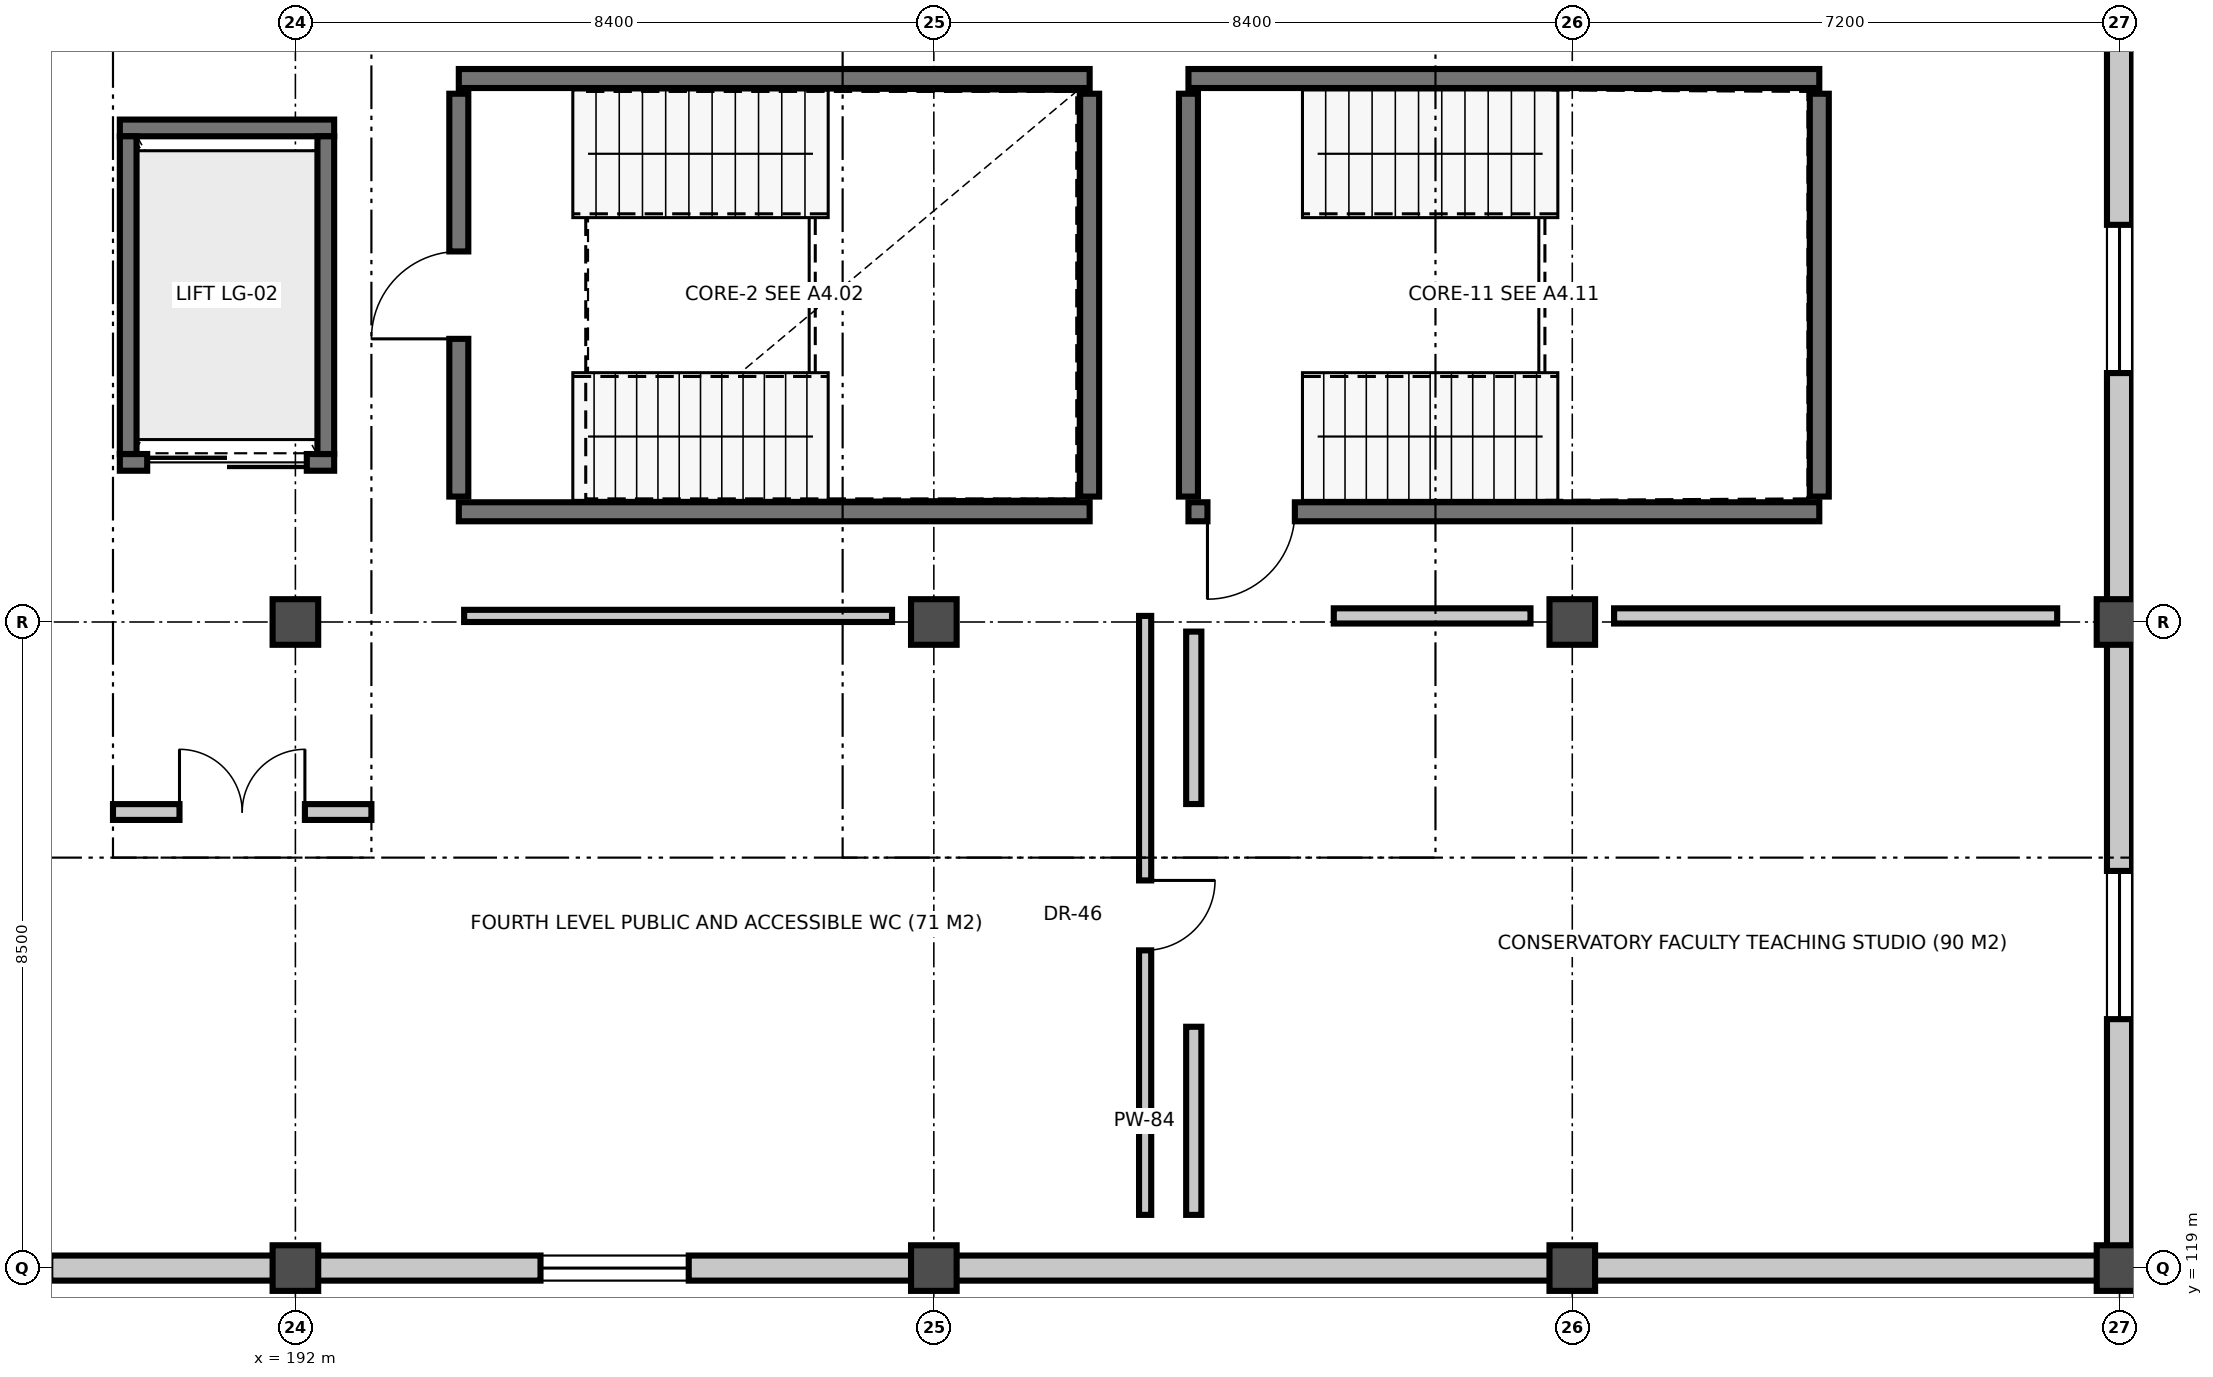
"""IFC4 building model, lengths in metres.
Left out: names, types, materials, properties, quantities, classifications, styles, units other than length and angle.
Written with IfcOpenShell. Run it as: python <this file> out.ifc"""

import sys

from ifc_helpers import new_model, si_unit, direction, frame, frame_2d, origin, origin_2d, place, context, subcontext, project, spatial, rectangle, extrude, element, fill, save


model = new_model("IFC4")
c1 = context("Model", 3, precision=1e-05, world=origin(), true_north=direction((0.0, 1.0)))
c2 = subcontext(c1, "Body", "Model", "MODEL_VIEW")
j1 = project(units=[si_unit("LENGTHUNIT", "METRE"), si_unit("PLANEANGLEUNIT", "RADIAN")], contexts=[c1])
p1 = place(None, origin())
s1 = spatial("IfcSite", under=j1, at=p1, CompositionType="ELEMENT")
p2 = place(p1, origin())
s2 = spatial("IfcBuilding", under=s1, at=p2, CompositionType="ELEMENT")
p3 = place(p2, frame((0.0, 0.0, 19.5)))
s3 = spatial("IfcBuildingStorey", under=s2, at=p3, CompositionType="ELEMENT", Elevation=19.5)
for number, where, z_axis, x_axis in (
    (1, (192.0, 119.0, 0.0), (0.0, 0.0, 1.0), (1.0, 0.0, 0.0)),
    (2, (192.0, 127.5, 0.0), (0.0, 0.0, 1.0), (1.0, 0.0, 0.0)),
    (3, (200.4, 119.0, 0.0), (0.0, 0.0, 1.0), (1.0, 0.0, 0.0)),
    (4, (200.4, 127.5, 0.0), (0.0, 0.0, 1.0), (1.0, 0.0, 0.0)),
    (5, (208.8, 119.0, 0.0), (0.0, 0.0, 1.0), (1.0, 0.0, 0.0)),
    (6, (208.8, 127.5, 0.0), (0.0, 0.0, 1.0), (1.0, 0.0, 0.0)),
    (7, (216.0, 119.0, 0.0), (0.0, 0.0, 1.0), (1.0, 0.0, 0.0)),
    (8, (216.0, 127.5, 0.0), (0.0, 0.0, 1.0), (1.0, 0.0, 0.0)),
):
    element("IfcColumn", number, at=place(p3, frame(where, z_axis=z_axis, x_axis=x_axis)), inside=s3, PredefinedType="COLUMN", context=c2, shape_type="SweptSolid", body=[
        extrude(rectangle(XDim=0.6, YDim=0.6, at=origin_2d()), origin(), (0.0, 0.0, 1.0), 4.2),
    ])
p4 = place(p3, frame((191.72, 119.0, 0.0), z_axis=(0.0, 0.0, 1.0), x_axis=(-1.0, 0.0, 0.0)))
e9 = element("IfcWall", 9, at=p4, inside=s3, PredefinedType="SOLIDWALL", context=c2, shape_type="SweptSolid", body=[
    extrude(rectangle(XDim=7.84, YDim=0.33, at=frame_2d((3.92, 0.0))), origin(), (0.0, 0.0, 1.0), 3.164),
])
p5 = place(p4, frame((2.945, 0.0, 1.0)))
e10 = element("IfcOpeningElement", 10, at=p5, cuts=e9, PredefinedType="OPENING", context=c2, shape_type="SweptSolid", body=[
    extrude(rectangle(XDim=1.95, YDim=1.8, at=frame_2d((0.975, 0.9))), frame((0.0, 0.175, 0.0), z_axis=(0.0, -1.0, 0.0), x_axis=(1.0, 0.0, 0.0)), (0.0, 0.0, 1.0), 0.35),
])
p6 = place(p3, frame((200.12, 119.0, 0.0), z_axis=(0.0, 0.0, 1.0), x_axis=(-1.0, 0.0, 0.0)))
e11 = element("IfcWall", 11, at=p6, inside=s3, PredefinedType="SOLIDWALL", context=c2, shape_type="SweptSolid", body=[
    extrude(rectangle(XDim=7.84, YDim=0.33, at=frame_2d((3.92, 0.0))), origin(), (0.0, 0.0, 1.0), 3.075),
])
p7 = place(p6, frame((2.945, 0.0, 1.0)))
e12 = element("IfcOpeningElement", 12, at=p7, cuts=e11, PredefinedType="OPENING", context=c2, shape_type="SweptSolid", body=[
    extrude(rectangle(XDim=1.95, YDim=1.8, at=frame_2d((0.975, 0.9))), frame((0.0, 0.175, 0.0), z_axis=(0.0, -1.0, 0.0), x_axis=(1.0, 0.0, 0.0)), (0.0, 0.0, 1.0), 0.35),
])
p8 = place(p3, frame((208.52, 119.0, 0.0), z_axis=(0.0, 0.0, 1.0), x_axis=(-1.0, 0.0, 0.0)))
e13 = element("IfcWall", 13, at=p8, inside=s3, PredefinedType="SOLIDWALL", context=c2, shape_type="SweptSolid", body=[
    extrude(rectangle(XDim=7.84, YDim=0.33, at=frame_2d((3.92, 0.0))), origin(), (0.0, 0.0, 1.0), 3.007),
])
p9 = place(p3, frame((215.72, 119.0, 0.0), z_axis=(0.0, 0.0, 1.0), x_axis=(-1.0, 0.0, 0.0)))
e14 = element("IfcWall", 14, at=p9, inside=s3, PredefinedType="SOLIDWALL", context=c2, shape_type="SweptSolid", body=[
    extrude(rectangle(XDim=6.64, YDim=0.33, at=frame_2d((3.32, 0.0))), origin(), (0.0, 0.0, 1.0), 2.908),
])
p10 = place(p3, frame((216.0, 127.22, 0.0), z_axis=(0.0, 0.0, 1.0), x_axis=(0.0, -1.0, 0.0)))
e15 = element("IfcWall", 15, at=p10, inside=s3, PredefinedType="SOLIDWALL", context=c2, shape_type="SweptSolid", body=[
    extrude(rectangle(XDim=7.94, YDim=0.33, at=frame_2d((3.97, 0.0))), origin(), (0.0, 0.0, 1.0), 3.241),
])
p11 = place(p10, frame((2.995, 0.0, 1.0)))
e16 = element("IfcOpeningElement", 16, at=p11, cuts=e15, PredefinedType="OPENING", context=c2, shape_type="SweptSolid", body=[
    extrude(rectangle(XDim=1.95, YDim=1.8, at=frame_2d((0.975, 0.9))), frame((0.0, 0.175, 0.0), z_axis=(0.0, -1.0, 0.0), x_axis=(1.0, 0.0, 0.0)), (0.0, 0.0, 1.0), 0.35),
])
p12 = place(p3, frame((216.0, 135.72, 0.0), z_axis=(0.0, 0.0, 1.0), x_axis=(0.0, -1.0, 0.0)))
e17 = element("IfcWall", 17, at=p12, inside=s3, PredefinedType="SOLIDWALL", context=c2, shape_type="SweptSolid", body=[
    extrude(rectangle(XDim=7.94, YDim=0.33, at=frame_2d((3.97, 0.0))), origin(), (0.0, 0.0, 1.0), 3.164),
])
p13 = place(p12, frame((2.995, 0.0, 1.0)))
e18 = element("IfcOpeningElement", 18, at=p13, cuts=e17, PredefinedType="OPENING", context=c2, shape_type="SweptSolid", body=[
    extrude(rectangle(XDim=1.95, YDim=1.8, at=frame_2d((0.975, 0.9))), frame((0.0, 0.175, 0.0), z_axis=(0.0, -1.0, 0.0), x_axis=(1.0, 0.0, 0.0)), (0.0, 0.0, 1.0), 0.35),
])
for number, where, z_axis, x_axis in (
    (19, (202.45, 128.95, 0.0), (0.0, 0.0, 1.0), (-1.0, 0.0, 0.0)),
    (20, (194.15, 134.65, 0.0), (0.0, 0.0, 1.0), (1.0, 0.0, 0.0)),
):
    element("IfcWall", number, at=place(p3, frame(where, z_axis=z_axis, x_axis=x_axis)), inside=s3, PredefinedType="SHEAR", context=c2, shape_type="SweptSolid", body=[
        extrude(rectangle(XDim=8.3, YDim=0.25, at=frame_2d((4.15, 0.0))), origin(), (0.0, 0.0, 1.0), 3.94),
    ])
p14 = place(p3, frame((194.15, 129.15, 0.0), z_axis=(0.0, 0.0, 1.0), x_axis=(0.0, 1.0, 0.0)))
e21 = element("IfcWall", 21, at=p14, inside=s3, PredefinedType="SHEAR", context=c2, shape_type="SweptSolid", body=[
    extrude(rectangle(XDim=5.3, YDim=0.25, at=frame_2d((2.65, 0.0))), origin(), (0.0, 0.0, 1.0), 3.94),
])
p15 = place(p14, frame((2.075, 0.0, 0.0)))
e22 = element("IfcOpeningElement", 22, at=p15, cuts=e21, PredefinedType="OPENING", context=c2, shape_type="SweptSolid", body=[
    extrude(rectangle(XDim=1.15, YDim=2.18, at=frame_2d((0.575, 1.09))), frame((0.0, 0.135, 0.0), z_axis=(0.0, -1.0, 0.0), x_axis=(1.0, 0.0, 0.0)), (0.0, 0.0, 1.0), 0.27),
])
p16 = place(p3, frame((202.45, 134.45, 0.0), z_axis=(0.0, 0.0, 1.0), x_axis=(0.0, -1.0, 0.0)))
e23 = element("IfcWall", 23, at=p16, inside=s3, PredefinedType="SHEAR", context=c2, shape_type="SweptSolid", body=[
    extrude(rectangle(XDim=5.3, YDim=0.25, at=frame_2d((2.65, 0.0))), origin(), (0.0, 0.0, 1.0), 3.94),
])
p17 = place(p3, frame((212.05, 128.95, 0.0), z_axis=(0.0, 0.0, 1.0), x_axis=(-1.0, 0.0, 0.0)))
e24 = element("IfcWall", 24, at=p17, inside=s3, PredefinedType="SHEAR", context=c2, shape_type="SweptSolid", body=[
    extrude(rectangle(XDim=8.3, YDim=0.25, at=frame_2d((4.15, 0.0))), origin(), (0.0, 0.0, 1.0), 3.94),
])
p18 = place(p17, frame((6.9, 0.0, 0.0)))
e25 = element("IfcOpeningElement", 25, at=p18, cuts=e24, PredefinedType="OPENING", context=c2, shape_type="SweptSolid", body=[
    extrude(rectangle(XDim=1.15, YDim=2.18, at=frame_2d((0.575, 1.09))), frame((0.0, 0.135, 0.0), z_axis=(0.0, -1.0, 0.0), x_axis=(1.0, 0.0, 0.0)), (0.0, 0.0, 1.0), 0.27),
])
p19 = place(p3, frame((203.75, 134.65, 0.0), z_axis=(0.0, 0.0, 1.0), x_axis=(1.0, 0.0, 0.0)))
e26 = element("IfcWall", 26, at=p19, inside=s3, PredefinedType="SHEAR", context=c2, shape_type="SweptSolid", body=[
    extrude(rectangle(XDim=8.3, YDim=0.25, at=frame_2d((4.15, 0.0))), origin(), (0.0, 0.0, 1.0), 3.94),
])
for number, where, z_axis, x_axis in (
    (27, (203.75, 129.15, 0.0), (0.0, 0.0, 1.0), (0.0, 1.0, 0.0)),
    (28, (212.05, 134.45, 0.0), (0.0, 0.0, 1.0), (0.0, -1.0, 0.0)),
):
    element("IfcWall", number, at=place(p3, frame(where, z_axis=z_axis, x_axis=x_axis)), inside=s3, PredefinedType="SHEAR", context=c2, shape_type="SweptSolid", body=[
        extrude(rectangle(XDim=5.3, YDim=0.25, at=frame_2d((2.65, 0.0))), origin(), (0.0, 0.0, 1.0), 3.94),
    ])
p20 = place(p3, frame((189.69, 129.6, 0.0), z_axis=(0.0, 0.0, 1.0), x_axis=(1.0, 0.0, 0.0)))
e29 = element("IfcWall", 29, at=p20, inside=s3, PredefinedType="SHEAR", context=c2, shape_type="SweptSolid", body=[
    extrude(rectangle(XDim=2.82, YDim=0.22, at=frame_2d((1.41, 0.0))), origin(), (0.0, 0.0, 1.0), 3.326),
])
p21 = place(p20, frame((0.36, 0.0, 0.0)))
e30 = element("IfcOpeningElement", 30, at=p21, cuts=e29, PredefinedType="OPENING", context=c2, shape_type="SweptSolid", body=[
    extrude(rectangle(XDim=2.1, YDim=2.45, at=frame_2d((1.05, 1.225))), frame((0.0, 0.12, 0.0), z_axis=(0.0, -1.0, 0.0), x_axis=(1.0, 0.0, 0.0)), (0.0, 0.0, 1.0), 0.24),
])
p22 = place(p3, frame((189.69, 134.0, 0.0), z_axis=(0.0, 0.0, 1.0), x_axis=(1.0, 0.0, 0.0)))
e31 = element("IfcWall", 31, at=p22, inside=s3, PredefinedType="SHEAR", context=c2, shape_type="SweptSolid", body=[
    extrude(rectangle(XDim=2.82, YDim=0.22, at=frame_2d((1.41, 0.0))), origin(), (0.0, 0.0, 1.0), 3.326),
])
p23 = place(p3, frame((189.8, 129.71, 0.0), z_axis=(0.0, 0.0, 1.0), x_axis=(0.0, 1.0, 0.0)))
e32 = element("IfcWall", 32, at=p23, inside=s3, PredefinedType="SHEAR", context=c2, shape_type="SweptSolid", body=[
    extrude(rectangle(XDim=4.18, YDim=0.22, at=frame_2d((2.09, 0.0))), origin(), (0.0, 0.0, 1.0), 3.94),
])
p24 = place(p3, frame((192.4, 129.71, 0.0), z_axis=(0.0, 0.0, 1.0), x_axis=(0.0, 1.0, 0.0)))
e33 = element("IfcWall", 33, at=p24, inside=s3, PredefinedType="SHEAR", context=c2, shape_type="SweptSolid", body=[
    extrude(rectangle(XDim=4.18, YDim=0.22, at=frame_2d((2.09, 0.0))), origin(), (0.0, 0.0, 1.0), 3.326),
])
p25 = place(p3, frame((189.6, 125.0, 0.0), z_axis=(0.0, 0.0, 1.0), x_axis=(1.0, 0.0, 0.0)))
e34 = element("IfcWall", 34, at=p25, inside=s3, PredefinedType="PARTITIONING", context=c2, shape_type="SweptSolid", body=[
    extrude(rectangle(XDim=3.4, YDim=0.208, at=frame_2d((1.7, 0.0))), origin(), (0.0, 0.0, 1.0), 3.034),
])
p26 = place(p25, frame((0.875, 0.0, 0.0)))
e35 = element("IfcOpeningElement", 35, at=p26, cuts=e34, PredefinedType="OPENING", context=c2, shape_type="SweptSolid", body=[
    extrude(rectangle(XDim=1.65, YDim=2.2, at=frame_2d((0.825, 1.1))), frame((0.0, 0.114, 0.0), z_axis=(0.0, -1.0, 0.0), x_axis=(1.0, 0.0, 0.0)), (0.0, 0.0, 1.0), 0.228),
])
p27 = place(p3, frame((194.22, 127.58, 0.0), z_axis=(0.0, 0.0, 1.0), x_axis=(1.0, 0.0, 0.0)))
e36 = element("IfcWall", 36, at=p27, inside=s3, PredefinedType="PARTITIONING", context=c2, shape_type="SweptSolid", body=[
    extrude(rectangle(XDim=5.63, YDim=0.16, at=frame_2d((2.815, 0.0))), origin(), (0.0, 0.0, 1.0), 2.86),
])
p28 = place(p3, frame((203.18, 127.58, 0.0), z_axis=(0.0, 0.0, 1.0), x_axis=(0.0, -1.0, 0.0)))
e37 = element("IfcWall", 37, at=p28, inside=s3, PredefinedType="PARTITIONING", context=c2, shape_type="SweptSolid", body=[
    extrude(rectangle(XDim=7.88, YDim=0.16, at=frame_2d((3.94, 0.0))), origin(), (0.0, 0.0, 1.0), 2.86),
])
p29 = place(p28, frame((3.48, 0.0, 0.0)))
e38 = element("IfcOpeningElement", 38, at=p29, cuts=e37, PredefinedType="OPENING", context=c2, shape_type="SweptSolid", body=[
    extrude(rectangle(XDim=0.92, YDim=2.12, at=frame_2d((0.46, 1.06))), frame((0.0, 0.09, 0.0), z_axis=(0.0, -1.0, 0.0), x_axis=(1.0, 0.0, 0.0)), (0.0, 0.0, 1.0), 0.18),
])
p30 = place(p3, frame((205.662, 127.58, 0.0), z_axis=(0.0, 0.0, 1.0), x_axis=(1.0, 0.0, 0.0)))
e39 = element("IfcWall", 39, at=p30, inside=s3, PredefinedType="PARTITIONING", context=c2, shape_type="SweptSolid", body=[
    extrude(rectangle(XDim=2.588, YDim=0.2, at=frame_2d((1.294, 0.0))), origin(), (0.0, 0.0, 1.0), 2.86),
])
p31 = place(p3, frame((209.35, 127.58, 0.0), z_axis=(0.0, 0.0, 1.0), x_axis=(1.0, 0.0, 0.0)))
e40 = element("IfcWall", 40, at=p31, inside=s3, PredefinedType="PARTITIONING", context=c2, shape_type="SweptSolid", body=[
    extrude(rectangle(XDim=5.83, YDim=0.2, at=frame_2d((2.915, 0.0))), origin(), (0.0, 0.0, 1.0), 2.86),
])
p32 = place(p3, frame((203.82, 119.7, 0.0), z_axis=(0.0, 0.0, 1.0), x_axis=(0.0, 1.0, 0.0)))
e41 = element("IfcWall", 41, at=p32, inside=s3, PredefinedType="PARTITIONING", context=c2, shape_type="SweptSolid", body=[
    extrude(rectangle(XDim=2.475, YDim=0.2, at=frame_2d((1.237, 0.0))), origin(), (0.0, 0.0, 1.0), 2.86),
])
p33 = place(p3, frame((203.82, 125.105, 0.0), z_axis=(0.0, 0.0, 1.0), x_axis=(0.0, 1.0, 0.0)))
e42 = element("IfcWall", 42, at=p33, inside=s3, PredefinedType="PARTITIONING", context=c2, shape_type="SweptSolid", body=[
    extrude(rectangle(XDim=2.269, YDim=0.2, at=frame_2d((1.134, 0.0))), origin(), (0.0, 0.0, 1.0), 2.86),
])
p34 = place(p7, origin())
e43 = element("IfcWindow", 43, at=p34, inside=s3, PartitioningType="SINGLE_PANEL", PredefinedType="WINDOW", context=c2, shape_type="SweptSolid", body=[
    extrude(rectangle(XDim=1.95, YDim=1.8, at=frame_2d((0.975, 0.9))), frame((0.0, 0.03, 0.0), z_axis=(0.0, -1.0, 0.0), x_axis=(1.0, 0.0, 0.0)), (0.0, 0.0, 1.0), 0.06),
])
fill(e12, e43)
p35 = place(p11, origin())
e44 = element("IfcWindow", 44, at=p35, inside=s3, PartitioningType="SINGLE_PANEL", PredefinedType="WINDOW", context=c2, shape_type="SweptSolid", body=[
    extrude(rectangle(XDim=1.95, YDim=1.8, at=frame_2d((0.975, 0.9))), frame((0.0, 0.03, 0.0), z_axis=(0.0, -1.0, 0.0), x_axis=(1.0, 0.0, 0.0)), (0.0, 0.0, 1.0), 0.06),
])
fill(e16, e44)
p36 = place(p13, origin())
e45 = element("IfcWindow", 45, at=p36, inside=s3, PartitioningType="SINGLE_PANEL", PredefinedType="WINDOW", context=c2, shape_type="SweptSolid", body=[
    extrude(rectangle(XDim=1.95, YDim=1.8, at=frame_2d((0.975, 0.9))), frame((0.0, 0.03, 0.0), z_axis=(0.0, -1.0, 0.0), x_axis=(1.0, 0.0, 0.0)), (0.0, 0.0, 1.0), 0.06),
])
fill(e18, e45)
p37 = place(p15, origin())
e46 = element("IfcDoor", 46, at=p37, inside=s3, OperationType="SINGLE_SWING_LEFT", PredefinedType="DOOR", context=c2, shape_type="SweptSolid", body=[
    extrude(rectangle(XDim=1.15, YDim=2.18, at=frame_2d((0.575, 1.09))), frame((0.0, 0.025, 0.0), z_axis=(0.0, -1.0, 0.0), x_axis=(1.0, 0.0, 0.0)), (0.0, 0.0, 1.0), 0.05),
])
fill(e22, e46)
p38 = place(p18, origin())
e47 = element("IfcDoor", 47, at=p38, inside=s3, OperationType="SINGLE_SWING_RIGHT", PredefinedType="DOOR", context=c2, shape_type="SweptSolid", body=[
    extrude(rectangle(XDim=1.15, YDim=2.18, at=frame_2d((0.575, 1.09))), frame((0.0, 0.025, 0.0), z_axis=(0.0, -1.0, 0.0), x_axis=(1.0, 0.0, 0.0)), (0.0, 0.0, 1.0), 0.05),
])
fill(e25, e47)
p39 = place(p21, origin())
e48 = element("IfcDoor", 48, at=p39, inside=s3, OperationType="DOUBLE_DOOR_SLIDING", PredefinedType="DOOR", context=c2, shape_type="SweptSolid", body=[
    extrude(rectangle(XDim=2.1, YDim=2.45, at=frame_2d((1.05, 1.225))), frame((0.0, 0.025, 0.0), z_axis=(0.0, -1.0, 0.0), x_axis=(1.0, 0.0, 0.0)), (0.0, 0.0, 1.0), 0.05),
])
fill(e30, e48)
p40 = place(p26, origin())
e49 = element("IfcDoor", 49, at=p40, inside=s3, OperationType="DOUBLE_DOOR_SINGLE_SWING", PredefinedType="DOOR", context=c2, shape_type="SweptSolid", body=[
    extrude(rectangle(XDim=1.65, YDim=2.2, at=frame_2d((0.825, 1.1))), frame((0.0, 0.025, 0.0), z_axis=(0.0, -1.0, 0.0), x_axis=(1.0, 0.0, 0.0)), (0.0, 0.0, 1.0), 0.05),
])
fill(e35, e49)
p41 = place(p29, origin())
e50 = element("IfcDoor", 50, at=p41, inside=s3, OperationType="SINGLE_SWING_LEFT", PredefinedType="DOOR", context=c2, shape_type="SweptSolid", body=[
    extrude(rectangle(XDim=0.92, YDim=2.12, at=frame_2d((0.46, 1.06))), frame((0.0, 0.025, 0.0), z_axis=(0.0, -1.0, 0.0), x_axis=(1.0, 0.0, 0.0)), (0.0, 0.0, 1.0), 0.05),
])
fill(e38, e50)
save(model, sys.argv[1])
